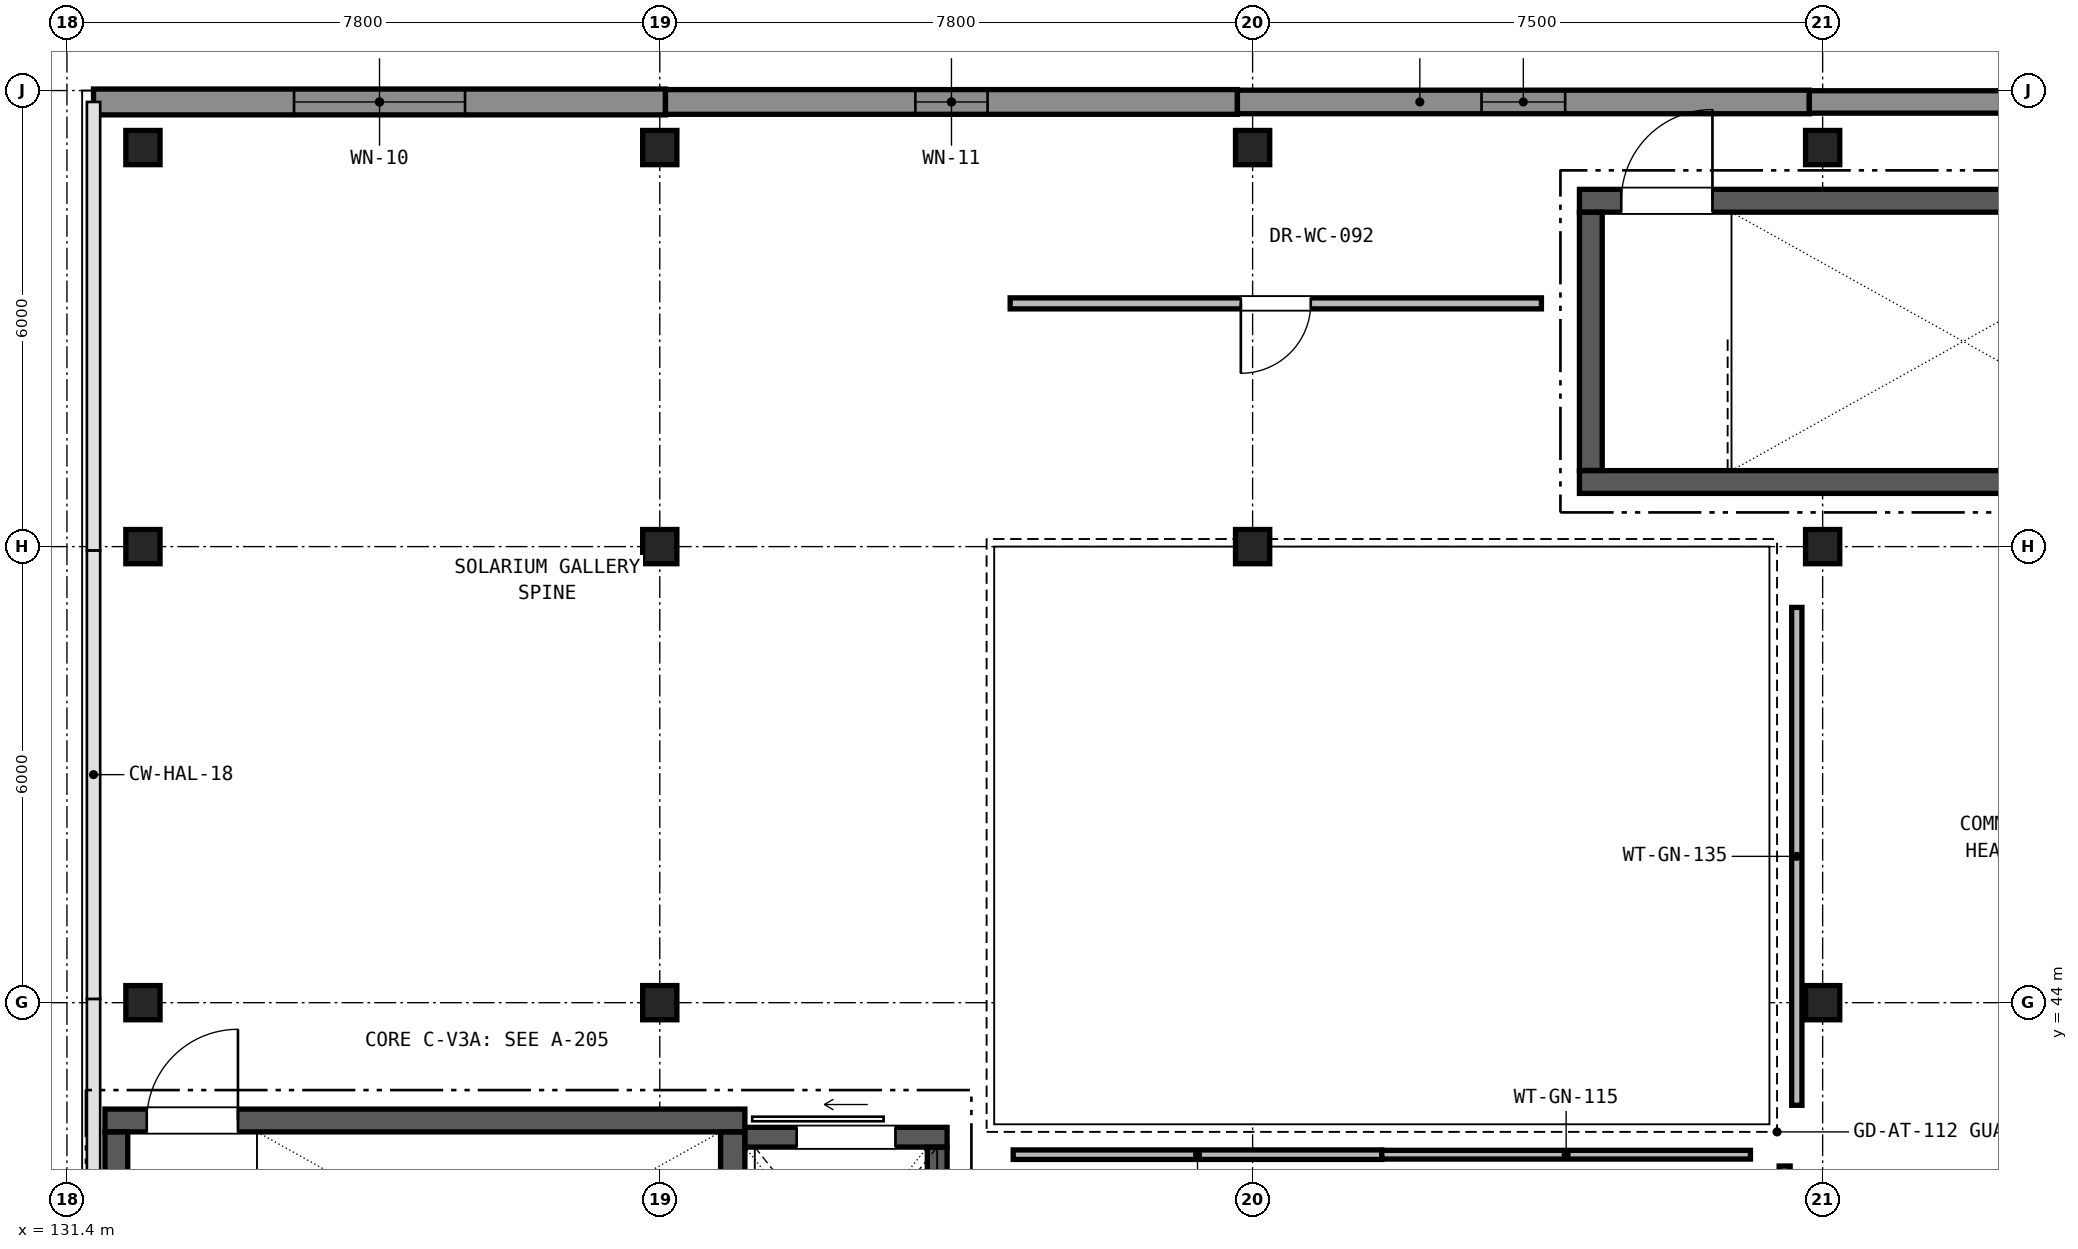
"""IFC4 building model, lengths in metres.
Left out: names, types, materials, properties, quantities, classifications, styles, units other than length and angle.
Written with IfcOpenShell. Run it as: python <this file> out.ifc"""

import sys

from ifc_helpers import new_model, si_unit, direction, frame, frame_2d, origin, origin_2d, place, context, subcontext, project, spatial, rectangle, extrude, element, fill, save


model = new_model("IFC4")
c1 = context("Model", 3, precision=1e-05, world=origin(), true_north=direction((0.0, 1.0)))
c2 = subcontext(c1, "Body", "Model", "MODEL_VIEW")
j1 = project(units=[si_unit("LENGTHUNIT", "METRE"), si_unit("PLANEANGLEUNIT", "RADIAN")], contexts=[c1])
p1 = place(None, origin())
s1 = spatial("IfcSite", under=j1, at=p1, CompositionType="ELEMENT")
p2 = place(p1, origin())
s2 = spatial("IfcBuilding", under=s1, at=p2, CompositionType="ELEMENT")
p3 = place(p2, frame((0.0, 0.0, 5.1)))
s3 = spatial("IfcBuildingStorey", under=s2, at=p3, CompositionType="ELEMENT", Elevation=5.1)
for number, where, z_axis, x_axis in (
    (1, (132.4, 44.0, 0.0), (0.0, 0.0, 1.0), (1.0, 0.0, 0.0)),
    (2, (132.4, 50.0, 0.0), (0.0, 0.0, 1.0), (1.0, 0.0, 0.0)),
    (3, (132.4, 55.25, 0.0), (0.0, 0.0, 1.0), (1.0, 0.0, 0.0)),
    (4, (139.2, 44.0, 0.0), (0.0, 0.0, 1.0), (1.0, 0.0, 0.0)),
    (5, (139.2, 50.0, 0.0), (0.0, 0.0, 1.0), (1.0, 0.0, 0.0)),
    (6, (139.2, 55.25, 0.0), (0.0, 0.0, 1.0), (1.0, 0.0, 0.0)),
    (7, (147.0, 50.0, 0.0), (0.0, 0.0, 1.0), (1.0, 0.0, 0.0)),
    (8, (147.0, 55.25, 0.0), (0.0, 0.0, 1.0), (1.0, 0.0, 0.0)),
    (9, (154.5, 50.0, 0.0), (0.0, 0.0, 1.0), (1.0, 0.0, 0.0)),
    (10, (154.5, 55.25, 0.0), (0.0, 0.0, 1.0), (1.0, 0.0, 0.0)),
    (11, (154.5, 44.0, 0.0), (0.0, 0.0, 1.0), (1.0, 0.0, 0.0)),
):
    element("IfcColumn", number, at=place(p3, frame(where, z_axis=z_axis, x_axis=x_axis)), inside=s3, PredefinedType="COLUMN", context=c2, shape_type="SweptSolid", body=[
        extrude(rectangle(XDim=0.45, YDim=0.45, at=origin_2d()), origin(), (0.0, 0.0, 1.0), 4.42),
    ])
p4 = place(p3, frame((131.75, 55.85, 0.0), z_axis=(0.0, 0.0, 1.0), x_axis=(1.0, 0.0, 0.0)))
e12 = element("IfcWall", 12, at=p4, inside=s3, PredefinedType="SOLIDWALL", context=c2, shape_type="SweptSolid", body=[
    extrude(rectangle(XDim=7.525, YDim=0.34, at=frame_2d((3.762, 0.0))), origin(), (0.0, 0.0, 1.0), 4.205),
])
p5 = place(p4, frame((2.638, 0.0, 0.9)))
e13 = element("IfcOpeningElement", 13, at=p5, cuts=e12, PredefinedType="OPENING", context=c2, shape_type="SweptSolid", body=[
    extrude(rectangle(XDim=2.25, YDim=1.5, at=frame_2d((1.125, 0.75))), frame((0.0, 0.18, 0.0), z_axis=(0.0, -1.0, 0.0), x_axis=(1.0, 0.0, 0.0)), (0.0, 0.0, 1.0), 0.36),
])
p6 = place(p3, frame((139.275, 55.85, 0.0), z_axis=(0.0, 0.0, 1.0), x_axis=(1.0, 0.0, 0.0)))
e14 = element("IfcWall", 14, at=p6, inside=s3, PredefinedType="SOLIDWALL", context=c2, shape_type="SweptSolid", body=[
    extrude(rectangle(XDim=7.525, YDim=0.325, at=frame_2d((3.763, 0.0))), origin(), (0.0, 0.0, 1.0), 4.205),
])
p7 = place(p6, frame((3.288, 0.0, 0.9)))
e15 = element("IfcOpeningElement", 15, at=p7, cuts=e14, PredefinedType="OPENING", context=c2, shape_type="SweptSolid", body=[
    extrude(rectangle(XDim=0.95, YDim=1.75, at=frame_2d((0.475, 0.875))), frame((0.0, 0.172, 0.0), z_axis=(0.0, -1.0, 0.0), x_axis=(1.0, 0.0, 0.0)), (0.0, 0.0, 1.0), 0.345),
])
p8 = place(p3, frame((146.8, 55.85, 0.0), z_axis=(0.0, 0.0, 1.0), x_axis=(1.0, 0.0, 0.0)))
e16 = element("IfcWall", 16, at=p8, inside=s3, PredefinedType="SOLIDWALL", context=c2, shape_type="SweptSolid", body=[
    extrude(rectangle(XDim=7.525, YDim=0.31, at=frame_2d((3.762, 0.0))), origin(), (0.0, 0.0, 1.0), 4.205),
])
p9 = place(p8, frame((3.212, 0.0, 0.9)))
e17 = element("IfcOpeningElement", 17, at=p9, cuts=e16, PredefinedType="OPENING", context=c2, shape_type="SweptSolid", body=[
    extrude(rectangle(XDim=1.1, YDim=1.75, at=frame_2d((0.55, 0.875))), frame((0.0, 0.165, 0.0), z_axis=(0.0, -1.0, 0.0), x_axis=(1.0, 0.0, 0.0)), (0.0, 0.0, 1.0), 0.33),
])
p10 = place(p3, frame((154.325, 55.85, 0.0), z_axis=(0.0, 0.0, 1.0), x_axis=(1.0, 0.0, 0.0)))
e18 = element("IfcWall", 18, at=p10, inside=s3, PredefinedType="SOLIDWALL", context=c2, shape_type="SweptSolid", body=[
    extrude(rectangle(XDim=7.525, YDim=0.295, at=frame_2d((3.763, 0.0))), origin(), (0.0, 0.0, 1.0), 4.205),
])
p11 = place(p10, frame((3.138, 0.0, 0.9)))
e19 = element("IfcOpeningElement", 19, at=p11, cuts=e18, PredefinedType="OPENING", context=c2, shape_type="SweptSolid", body=[
    extrude(rectangle(XDim=1.25, YDim=1.75, at=frame_2d((0.625, 0.875))), frame((0.0, 0.157, 0.0), z_axis=(0.0, -1.0, 0.0), x_axis=(1.0, 0.0, 0.0)), (0.0, 0.0, 1.0), 0.315),
])
p12 = place(p3, frame((131.9, 42.45, 0.0), z_axis=(0.0, 0.0, 1.0), x_axis=(1.0, 0.0, 0.0)))
e20 = element("IfcWall", 20, at=p12, inside=s3, PredefinedType="SHEAR", context=c2, shape_type="SweptSolid", body=[
    extrude(rectangle(XDim=8.42, YDim=0.3, at=frame_2d((4.21, 0.0))), origin(), (0.0, 0.0, 1.0), 4.205),
])
p13 = place(p12, frame((0.55, 0.0, 0.0)))
e21 = element("IfcOpeningElement", 21, at=p13, cuts=e20, PredefinedType="OPENING", context=c2, shape_type="SweptSolid", body=[
    extrude(rectangle(XDim=1.2, YDim=2.2, at=frame_2d((0.6, 1.1))), frame((0.0, 0.16, 0.0), z_axis=(0.0, -1.0, 0.0), x_axis=(1.0, 0.0, 0.0)), (0.0, 0.0, 1.0), 0.32),
])
p14 = place(p3, frame((132.05, 38.902, 0.0), z_axis=(0.0, 0.0, 1.0), x_axis=(0.0, 1.0, 0.0)))
e22 = element("IfcWall", 22, at=p14, inside=s3, PredefinedType="SHEAR", context=c2, shape_type="SweptSolid", body=[
    extrude(rectangle(XDim=3.396, YDim=0.3, at=frame_2d((1.698, 0.0))), origin(), (0.0, 0.0, 1.0), 4.205),
])
p15 = place(p3, frame((140.16, 38.902, 0.0), z_axis=(0.0, 0.0, 1.0), x_axis=(0.0, 1.0, 0.0)))
e23 = element("IfcWall", 23, at=p15, inside=s3, PredefinedType="SHEAR", context=c2, shape_type="SweptSolid", body=[
    extrude(rectangle(XDim=3.396, YDim=0.32, at=frame_2d((1.698, 0.0))), origin(), (0.0, 0.0, 1.0), 4.205),
])
p16 = place(p3, frame((140.322, 42.23, 0.0), z_axis=(0.0, 0.0, 1.0), x_axis=(1.0, 0.0, 0.0)))
e24 = element("IfcWall", 24, at=p16, inside=s3, PredefinedType="SHEAR", context=c2, shape_type="SweptSolid", body=[
    extrude(rectangle(XDim=2.658, YDim=0.26, at=frame_2d((1.329, 0.0))), origin(), (0.0, 0.0, 1.0), 4.205),
])
p17 = place(p16, frame((0.679, 0.0, 0.0)))
e25 = element("IfcOpeningElement", 25, at=p17, cuts=e24, PredefinedType="OPENING", context=c2, shape_type="SweptSolid", body=[
    extrude(rectangle(XDim=1.3, YDim=2.2, at=frame_2d((0.65, 1.1))), frame((0.0, 0.14, 0.0), z_axis=(0.0, -1.0, 0.0), x_axis=(1.0, 0.0, 0.0)), (0.0, 0.0, 1.0), 0.28),
])
p18 = place(p3, frame((142.85, 39.102, 0.0), z_axis=(0.0, 0.0, 1.0), x_axis=(0.0, 1.0, 0.0)))
e26 = element("IfcWall", 26, at=p18, inside=s3, PredefinedType="SHEAR", context=c2, shape_type="SweptSolid", body=[
    extrude(rectangle(XDim=2.996, YDim=0.26, at=frame_2d((1.498, 0.0))), origin(), (0.0, 0.0, 1.0), 4.205),
])
p19 = place(p3, frame((151.3, 50.85, 0.0), z_axis=(0.0, 0.0, 1.0), x_axis=(1.0, 0.0, 0.0)))
e27 = element("IfcWall", 27, at=p19, inside=s3, PredefinedType="SHEAR", context=c2, shape_type="SweptSolid", body=[
    extrude(rectangle(XDim=8.42, YDim=0.3, at=frame_2d((4.21, 0.0))), origin(), (0.0, 0.0, 1.0), 4.205),
])
p20 = place(p3, frame((151.3, 54.55, 0.0), z_axis=(0.0, 0.0, 1.0), x_axis=(1.0, 0.0, 0.0)))
e28 = element("IfcWall", 28, at=p20, inside=s3, PredefinedType="SHEAR", context=c2, shape_type="SweptSolid", body=[
    extrude(rectangle(XDim=8.42, YDim=0.3, at=frame_2d((4.21, 0.0))), origin(), (0.0, 0.0, 1.0), 4.205),
])
p21 = place(p20, frame((0.55, 0.0, 0.0)))
e29 = element("IfcOpeningElement", 29, at=p21, cuts=e28, PredefinedType="OPENING", context=c2, shape_type="SweptSolid", body=[
    extrude(rectangle(XDim=1.2, YDim=2.2, at=frame_2d((0.6, 1.1))), frame((0.0, 0.16, 0.0), z_axis=(0.0, -1.0, 0.0), x_axis=(1.0, 0.0, 0.0)), (0.0, 0.0, 1.0), 0.32),
])
p22 = place(p3, frame((151.45, 51.002, 0.0), z_axis=(0.0, 0.0, 1.0), x_axis=(0.0, 1.0, 0.0)))
e30 = element("IfcWall", 30, at=p22, inside=s3, PredefinedType="SHEAR", context=c2, shape_type="SweptSolid", body=[
    extrude(rectangle(XDim=3.396, YDim=0.3, at=frame_2d((1.698, 0.0))), origin(), (0.0, 0.0, 1.0), 4.205),
])
p23 = place(p3, frame((154.0, 38.75, 0.0), z_axis=(0.0, 0.0, 1.0), x_axis=(0.0, 1.0, 0.0)))
e31 = element("IfcWall", 31, at=p23, inside=s3, PredefinedType="PARTITIONING", context=c2, shape_type="SweptSolid", body=[
    extrude(rectangle(XDim=3.101, YDim=0.145, at=frame_2d((1.551, 0.0))), origin(), (0.0, 0.0, 1.0), 3.455),
])
p24 = place(p3, frame((154.16, 42.65, 0.0), z_axis=(0.0, 0.0, 1.0), x_axis=(0.0, 1.0, 0.0)))
e32 = element("IfcWall", 32, at=p24, inside=s3, PredefinedType="PARTITIONING", context=c2, shape_type="SweptSolid", body=[
    extrude(rectangle(XDim=6.55, YDim=0.135, at=frame_2d((3.275, 0.0))), origin(), (0.0, 0.0, 1.0), 4.205),
])
p25 = place(p3, frame((143.85, 42.0, 0.0), z_axis=(0.0, 0.0, 1.0), x_axis=(1.0, 0.0, 0.0)))
e33 = element("IfcWall", 33, at=p25, inside=s3, PredefinedType="PARTITIONING", context=c2, shape_type="SweptSolid", body=[
    extrude(rectangle(XDim=4.85, YDim=0.125, at=frame_2d((2.425, 0.0))), origin(), (0.0, 0.0, 1.0), 3.891),
])
p26 = place(p3, frame((148.7, 42.0, 0.0), z_axis=(0.0, 0.0, 1.0), x_axis=(1.0, 0.0, 0.0)))
e34 = element("IfcWall", 34, at=p26, inside=s3, PredefinedType="PARTITIONING", context=c2, shape_type="SweptSolid", body=[
    extrude(rectangle(XDim=4.85, YDim=0.115, at=frame_2d((2.425, 0.0))), origin(), (0.0, 0.0, 1.0), 4.205),
])
p27 = place(p3, frame((150.8, 53.2, 0.0), z_axis=(0.0, 0.0, 1.0), x_axis=(-1.0, 0.0, 0.0)))
e35 = element("IfcWall", 35, at=p27, inside=s3, PredefinedType="PARTITIONING", context=c2, shape_type="SweptSolid", body=[
    extrude(rectangle(XDim=6.99, YDim=0.145, at=frame_2d((3.495, 0.0))), origin(), (0.0, 0.0, 1.0), 3.891),
])
p28 = place(p27, frame((3.035, 0.0, 0.0)))
e36 = element("IfcOpeningElement", 36, at=p28, cuts=e35, PredefinedType="OPENING", context=c2, shape_type="SweptSolid", body=[
    extrude(rectangle(XDim=0.92, YDim=2.12, at=frame_2d((0.46, 1.06))), frame((0.0, 0.083, 0.0), z_axis=(0.0, -1.0, 0.0), x_axis=(1.0, 0.0, 0.0)), (0.0, 0.0, 1.0), 0.165),
])
p29 = place(p5, origin())
e37 = element("IfcWindow", 37, at=p29, inside=s3, PartitioningType="SINGLE_PANEL", PredefinedType="WINDOW", context=c2, shape_type="SweptSolid", body=[
    extrude(rectangle(XDim=2.25, YDim=1.5, at=frame_2d((1.125, 0.75))), frame((0.0, 0.03, 0.0), z_axis=(0.0, -1.0, 0.0), x_axis=(1.0, 0.0, 0.0)), (0.0, 0.0, 1.0), 0.06),
])
fill(e13, e37)
p30 = place(p7, origin())
e38 = element("IfcWindow", 38, at=p30, inside=s3, PartitioningType="SINGLE_PANEL", PredefinedType="WINDOW", context=c2, shape_type="SweptSolid", body=[
    extrude(rectangle(XDim=0.95, YDim=1.75, at=frame_2d((0.475, 0.875))), frame((0.0, 0.03, 0.0), z_axis=(0.0, -1.0, 0.0), x_axis=(1.0, 0.0, 0.0)), (0.0, 0.0, 1.0), 0.06),
])
fill(e15, e38)
p31 = place(p9, origin())
e39 = element("IfcWindow", 39, at=p31, inside=s3, PartitioningType="SINGLE_PANEL", PredefinedType="WINDOW", context=c2, shape_type="SweptSolid", body=[
    extrude(rectangle(XDim=1.1, YDim=1.75, at=frame_2d((0.55, 0.875))), frame((0.0, 0.03, 0.0), z_axis=(0.0, -1.0, 0.0), x_axis=(1.0, 0.0, 0.0)), (0.0, 0.0, 1.0), 0.06),
])
fill(e17, e39)
p32 = place(p13, origin())
e40 = element("IfcDoor", 40, at=p32, inside=s3, OperationType="SINGLE_SWING_RIGHT", PredefinedType="DOOR", context=c2, shape_type="SweptSolid", body=[
    extrude(rectangle(XDim=1.2, YDim=2.2, at=frame_2d((0.6, 1.1))), frame((0.0, 0.025, 0.0), z_axis=(0.0, -1.0, 0.0), x_axis=(1.0, 0.0, 0.0)), (0.0, 0.0, 1.0), 0.05),
])
fill(e21, e40)
p33 = place(p17, origin())
e41 = element("IfcDoor", 41, at=p33, inside=s3, OperationType="SLIDING_TO_LEFT", PredefinedType="DOOR", context=c2, shape_type="SweptSolid", body=[
    extrude(rectangle(XDim=1.3, YDim=2.2, at=frame_2d((0.65, 1.1))), frame((0.0, 0.025, 0.0), z_axis=(0.0, -1.0, 0.0), x_axis=(1.0, 0.0, 0.0)), (0.0, 0.0, 1.0), 0.05),
])
fill(e25, e41)
p34 = place(p21, origin())
e42 = element("IfcDoor", 42, at=p34, inside=s3, OperationType="SINGLE_SWING_RIGHT", PredefinedType="DOOR", context=c2, shape_type="SweptSolid", body=[
    extrude(rectangle(XDim=1.2, YDim=2.2, at=frame_2d((0.6, 1.1))), frame((0.0, 0.025, 0.0), z_axis=(0.0, -1.0, 0.0), x_axis=(1.0, 0.0, 0.0)), (0.0, 0.0, 1.0), 0.05),
])
fill(e29, e42)
p35 = place(p28, origin())
e43 = element("IfcDoor", 43, at=p35, inside=s3, OperationType="SINGLE_SWING_RIGHT", PredefinedType="DOOR", context=c2, shape_type="SweptSolid", body=[
    extrude(rectangle(XDim=0.92, YDim=2.12, at=frame_2d((0.46, 1.06))), frame((0.0, 0.025, 0.0), z_axis=(0.0, -1.0, 0.0), x_axis=(1.0, 0.0, 0.0)), (0.0, 0.0, 1.0), 0.05),
])
fill(e36, e43)
save(model, sys.argv[1])
